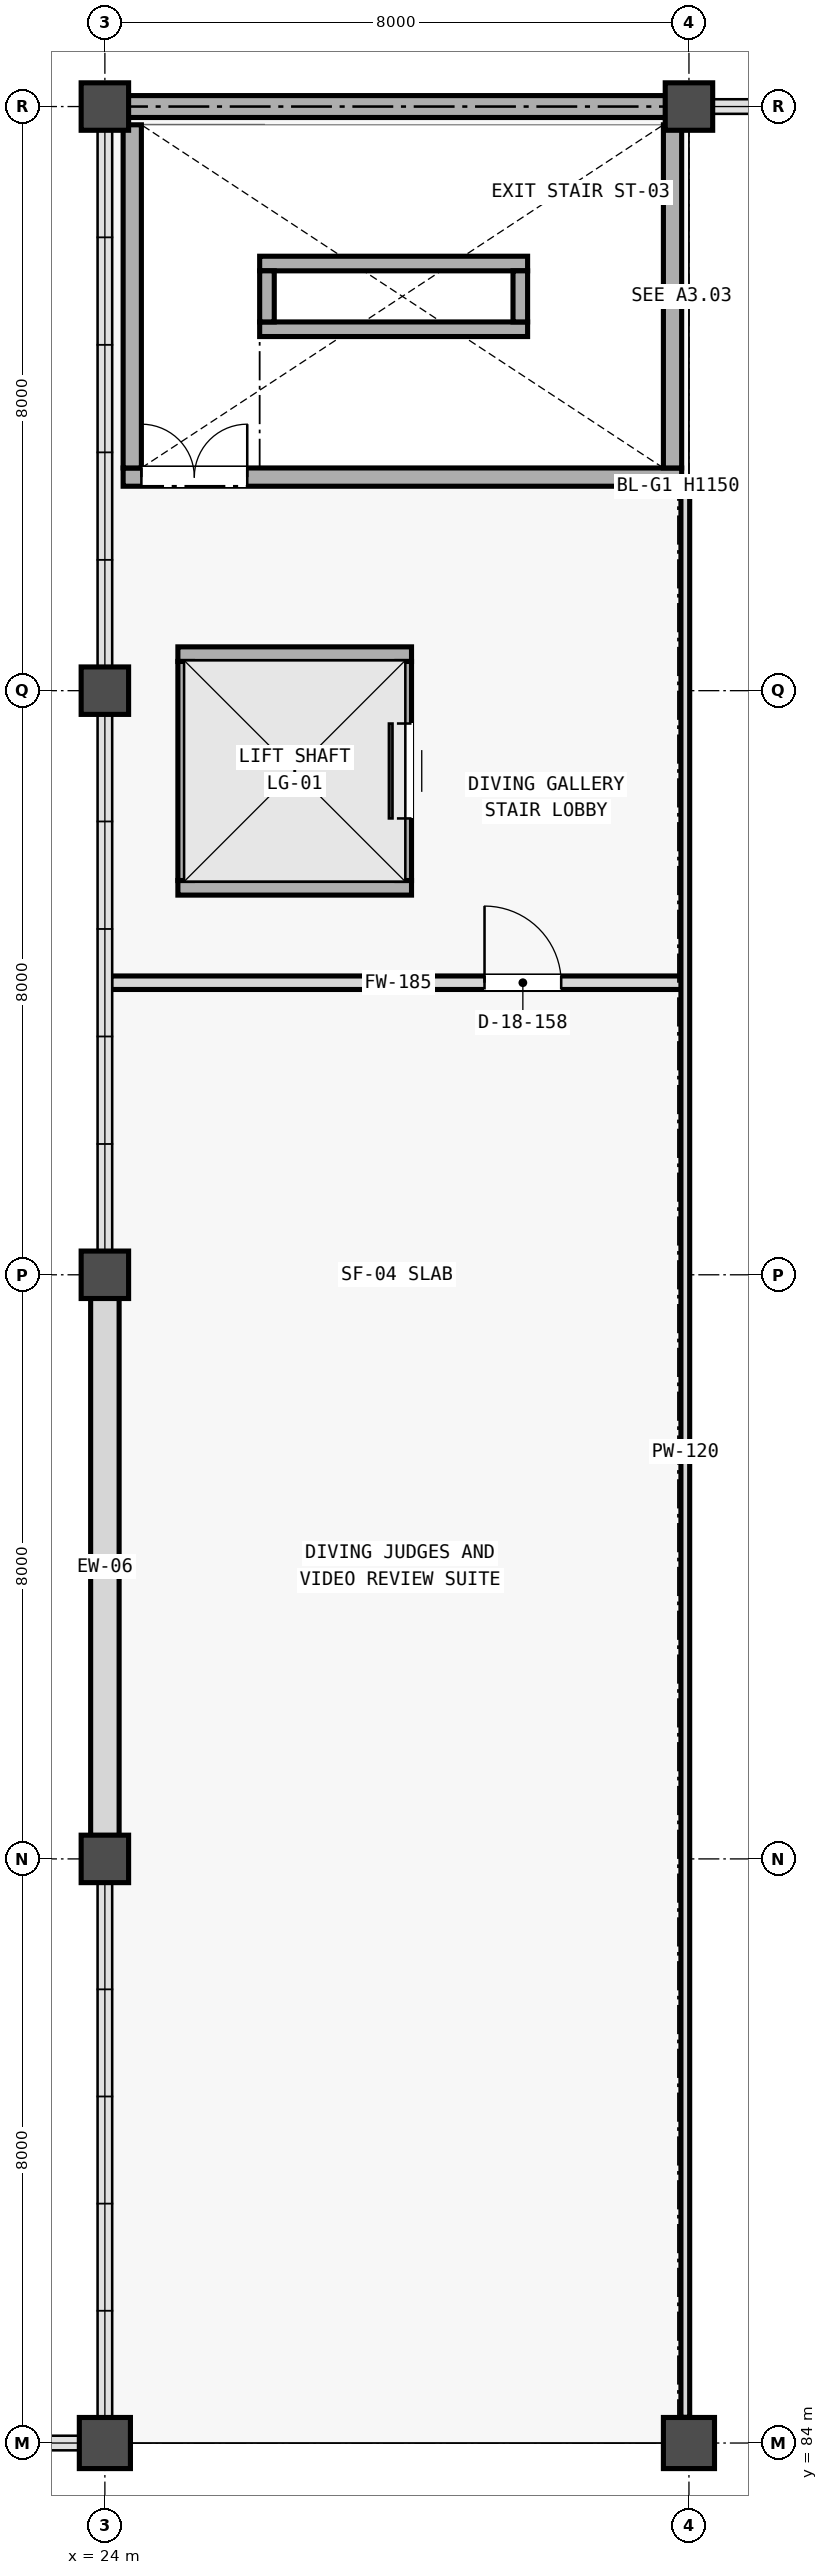
"""IFC4 building model, lengths in metres.
Left out: names, types, materials, properties, quantities, classifications, styles, units other than length and angle.
Written with IfcOpenShell. Run it as: python <this file> out.ifc"""

import sys

from ifc_helpers import new_model, si_unit, direction, frame, frame_2d, origin, origin_2d, place, context, subcontext, project, spatial, rectangle, extrude, element, fill, save


model = new_model("IFC4")
c1 = context("Model", 3, precision=1e-05, world=origin(), true_north=direction((0.0, 1.0)))
c2 = subcontext(c1, "Body", "Model", "MODEL_VIEW")
j1 = project(units=[si_unit("LENGTHUNIT", "METRE"), si_unit("PLANEANGLEUNIT", "RADIAN")], contexts=[c1])
p1 = place(None, origin())
s1 = spatial("IfcSite", under=j1, at=p1, CompositionType="ELEMENT")
p2 = place(p1, origin())
s2 = spatial("IfcBuilding", under=s1, at=p2, CompositionType="ELEMENT")
p3 = place(p2, frame((0.0, 0.0, 10.2)))
s3 = spatial("IfcBuildingStorey", under=s2, at=p3, CompositionType="ELEMENT", Elevation=10.2)
p4 = place(p3, frame((24.0, 84.0, 0.0), z_axis=(0.0, 0.0, 1.0), x_axis=(1.0, 0.0, 0.0)))
e1 = element("IfcColumn", 1, at=p4, inside=s3, PredefinedType="COLUMN", context=c2, shape_type="SweptSolid", body=[
    extrude(rectangle(XDim=0.7, YDim=0.7, at=origin_2d()), origin(), (0.0, 0.0, 1.0), 7.325),
])
p5 = place(p3, frame((32.0, 84.0, 0.0), z_axis=(0.0, 0.0, 1.0), x_axis=(1.0, 0.0, 0.0)))
e2 = element("IfcColumn", 2, at=p5, inside=s3, PredefinedType="COLUMN", context=c2, shape_type="SweptSolid", body=[
    extrude(rectangle(XDim=0.7, YDim=0.7, at=origin_2d()), origin(), (0.0, 0.0, 1.0), 7.825),
])
for number, where, z_axis, x_axis in (
    (3, (24.0, 116.0, 0.0), (0.0, 0.0, 1.0), (1.0, 0.0, 0.0)),
    (4, (32.0, 116.0, 0.0), (0.0, 0.0, 1.0), (1.0, 0.0, 0.0)),
    (5, (24.0, 92.0, 0.0), (0.0, 0.0, 1.0), (1.0, 0.0, 0.0)),
    (6, (24.0, 100.0, 0.0), (0.0, 0.0, 1.0), (1.0, 0.0, 0.0)),
    (7, (24.0, 108.0, 0.0), (0.0, 0.0, 1.0), (1.0, 0.0, 0.0)),
):
    element("IfcColumn", number, at=place(p3, frame(where, z_axis=z_axis, x_axis=x_axis)), inside=s3, PredefinedType="COLUMN", context=c2, shape_type="SweptSolid", body=[
        extrude(rectangle(XDim=0.65, YDim=0.65, at=origin_2d()), origin(), (0.0, 0.0, 1.0), 4.2),
    ])
p6 = place(p3, frame((24.321, 116.0, 0.0), z_axis=(0.0, 0.0, 1.0), x_axis=(1.0, 0.0, 0.0)))
e8 = element("IfcWall", 8, at=p6, inside=s3, PredefinedType="SHEAR", context=c2, shape_type="SweptSolid", body=[
    extrude(rectangle(XDim=7.358, YDim=0.3, at=frame_2d((3.679, 0.0))), origin(), (0.0, 0.0, 1.0), 4.2),
])
p7 = place(p3, frame((24.0, 92.321, 0.0), z_axis=(0.0, 0.0, 1.0), x_axis=(0.0, 1.0, 0.0)))
e9 = element("IfcWall", 9, at=p7, inside=s3, PredefinedType="STANDARD", context=c2, shape_type="SweptSolid", body=[
    extrude(rectangle(XDim=7.358, YDim=0.39, at=frame_2d((3.679, 0.0))), origin(), (0.0, 0.0, 1.0), 3.39),
])
p8 = place(p3, frame((24.25, 110.925, 0.0), z_axis=(0.0, 0.0, 1.0), x_axis=(1.0, 0.0, 0.0)))
e10 = element("IfcWall", 10, at=p8, inside=s3, PredefinedType="SHEAR", context=c2, shape_type="SweptSolid", body=[
    extrude(rectangle(XDim=7.65, YDim=0.25, at=frame_2d((3.825, 0.0))), origin(), (0.0, 0.0, 1.0), 3.96),
])
p9 = place(p8, frame((0.25, 0.0, 0.0)))
e11 = element("IfcOpeningElement", 11, at=p9, cuts=e10, PredefinedType="OPENING", context=c2, shape_type="SweptSolid", body=[
    extrude(rectangle(XDim=1.45, YDim=2.2, at=frame_2d((0.725, 1.1))), frame((0.0, 0.135, 0.0), z_axis=(0.0, -1.0, 0.0), x_axis=(1.0, 0.0, 0.0)), (0.0, 0.0, 1.0), 0.27),
])
for number, where, z_axis, x_axis in (
    (12, (24.375, 111.05, 0.0), (0.0, 0.0, 1.0), (0.0, 1.0, 0.0)),
    (13, (31.775, 111.05, 0.0), (0.0, 0.0, 1.0), (0.0, 1.0, 0.0)),
):
    element("IfcWall", number, at=place(p3, frame(where, z_axis=z_axis, x_axis=x_axis)), inside=s3, PredefinedType="SHEAR", context=c2, shape_type="SweptSolid", body=[
        extrude(rectangle(XDim=4.7, YDim=0.25, at=frame_2d((2.35, 0.0))), origin(), (0.0, 0.0, 1.0), 3.96),
    ])
for number, where, z_axis, x_axis in (
    (14, (26.12, 112.95, 0.0), (0.0, 0.0, 1.0), (1.0, 0.0, 0.0)),
    (15, (26.12, 113.85, 0.0), (0.0, 0.0, 1.0), (1.0, 0.0, 0.0)),
):
    element("IfcWall", number, at=place(p3, frame(where, z_axis=z_axis, x_axis=x_axis)), inside=s3, PredefinedType="SHEAR", context=c2, shape_type="SweptSolid", body=[
        extrude(rectangle(XDim=3.67, YDim=0.2, at=frame_2d((1.835, 0.0))), origin(), (0.0, 0.0, 1.0), 3.96),
    ])
for number, where, z_axis, x_axis in (
    (16, (26.22, 113.05, 0.0), (0.0, 0.0, 1.0), (0.0, 1.0, 0.0)),
    (17, (29.69, 113.05, 0.0), (0.0, 0.0, 1.0), (0.0, 1.0, 0.0)),
):
    element("IfcWall", number, at=place(p3, frame(where, z_axis=z_axis, x_axis=x_axis)), inside=s3, PredefinedType="SHEAR", context=c2, shape_type="SweptSolid", body=[
        extrude(rectangle(XDim=0.7, YDim=0.2, at=frame_2d((0.35, 0.0))), origin(), (0.0, 0.0, 1.0), 3.96),
    ])
for number, where, z_axis, x_axis in (
    (18, (25.0, 105.3, 0.0), (0.0, 0.0, 1.0), (1.0, 0.0, 0.0)),
    (19, (25.0, 108.5, 0.0), (0.0, 0.0, 1.0), (1.0, 0.0, 0.0)),
):
    element("IfcWall", number, at=place(p3, frame(where, z_axis=z_axis, x_axis=x_axis)), inside=s3, PredefinedType="SHEAR", context=c2, shape_type="SweptSolid", body=[
        extrude(rectangle(XDim=3.2, YDim=0.2, at=frame_2d((1.6, 0.0))), origin(), (0.0, 0.0, 1.0), 3.96),
    ])
p10 = place(p3, frame((25.1, 105.4, 0.0), z_axis=(0.0, 0.0, 1.0), x_axis=(0.0, 1.0, 0.0)))
e20 = element("IfcWall", 20, at=p10, inside=s3, PredefinedType="SHEAR", context=c2, shape_type="SweptSolid", body=[
    extrude(rectangle(XDim=3.0, YDim=0.2, at=frame_2d((1.5, 0.0))), origin(), (0.0, 0.0, 1.0), 3.96),
])
p11 = place(p3, frame((28.1, 105.4, 0.0), z_axis=(0.0, 0.0, 1.0), x_axis=(0.0, 1.0, 0.0)))
e21 = element("IfcWall", 21, at=p11, inside=s3, PredefinedType="SHEAR", context=c2, shape_type="SweptSolid", body=[
    extrude(rectangle(XDim=3.0, YDim=0.2, at=frame_2d((1.5, 0.0))), origin(), (0.0, 0.0, 1.0), 3.96),
])
p12 = place(p11, frame((0.85, 0.0, 0.0)))
e22 = element("IfcOpeningElement", 22, at=p12, cuts=e21, PredefinedType="OPENING", context=c2, shape_type="SweptSolid", body=[
    extrude(rectangle(XDim=1.3, YDim=2.3, at=frame_2d((0.65, 1.15))), frame((0.0, 0.11, 0.0), z_axis=(0.0, -1.0, 0.0), x_axis=(1.0, 0.0, 0.0)), (0.0, 0.0, 1.0), 0.22),
])
p13 = place(p3, frame((24.08, 104.0, 0.0), z_axis=(0.0, 0.0, 1.0), x_axis=(1.0, 0.0, 0.0)))
e23 = element("IfcWall", 23, at=p13, inside=s3, PredefinedType="STANDARD", context=c2, shape_type="SweptSolid", body=[
    extrude(rectangle(XDim=7.87, YDim=0.185, at=frame_2d((3.935, 0.0))), origin(), (0.0, 0.0, 1.0), 3.39),
])
p14 = place(p13, frame((5.12, 0.0, 0.0)))
e24 = element("IfcOpeningElement", 24, at=p14, cuts=e23, PredefinedType="OPENING", context=c2, shape_type="SweptSolid", body=[
    extrude(rectangle(XDim=1.05, YDim=2.2, at=frame_2d((0.525, 1.1))), frame((0.0, 0.103, 0.0), z_axis=(0.0, -1.0, 0.0), x_axis=(1.0, 0.0, 0.0)), (0.0, 0.0, 1.0), 0.205),
])
p15 = place(p3, frame((31.95, 84.352, 0.0), z_axis=(0.0, 0.0, 1.0), x_axis=(0.0, 1.0, 0.0)))
e25 = element("IfcWall", 25, at=p15, inside=s3, PredefinedType="PARTITIONING", context=c2, shape_type="SweptSolid", body=[
    extrude(rectangle(XDim=26.448, YDim=0.12, at=frame_2d((13.224, 0.0))), origin(), (0.0, 0.0, 1.0), 3.945),
])
p16 = place(p9, origin())
e26 = element("IfcDoor", 26, at=p16, inside=s3, OperationType="DOUBLE_DOOR_SINGLE_SWING", PredefinedType="DOOR", context=c2, shape_type="SweptSolid", body=[
    extrude(rectangle(XDim=1.45, YDim=2.2, at=frame_2d((0.725, 1.1))), frame((0.0, 0.025, 0.0), z_axis=(0.0, -1.0, 0.0), x_axis=(1.0, 0.0, 0.0)), (0.0, 0.0, 1.0), 0.05),
])
fill(e11, e26)
p17 = place(p12, origin())
e27 = element("IfcDoor", 27, at=p17, inside=s3, OperationType="SLIDING_TO_RIGHT", PredefinedType="DOOR", context=c2, shape_type="SweptSolid", body=[
    extrude(rectangle(XDim=1.3, YDim=2.3, at=frame_2d((0.65, 1.15))), frame((0.0, 0.025, 0.0), z_axis=(0.0, -1.0, 0.0), x_axis=(1.0, 0.0, 0.0)), (0.0, 0.0, 1.0), 0.05),
])
fill(e22, e27)
p18 = place(p14, origin())
e28 = element("IfcDoor", 28, at=p18, inside=s3, OperationType="SINGLE_SWING_LEFT", PredefinedType="DOOR", context=c2, shape_type="SweptSolid", body=[
    extrude(rectangle(XDim=1.05, YDim=2.2, at=frame_2d((0.525, 1.1))), frame((0.0, 0.025, 0.0), z_axis=(0.0, -1.0, 0.0), x_axis=(1.0, 0.0, 0.0)), (0.0, 0.0, 1.0), 0.05),
])
fill(e24, e28)
save(model, sys.argv[1])
